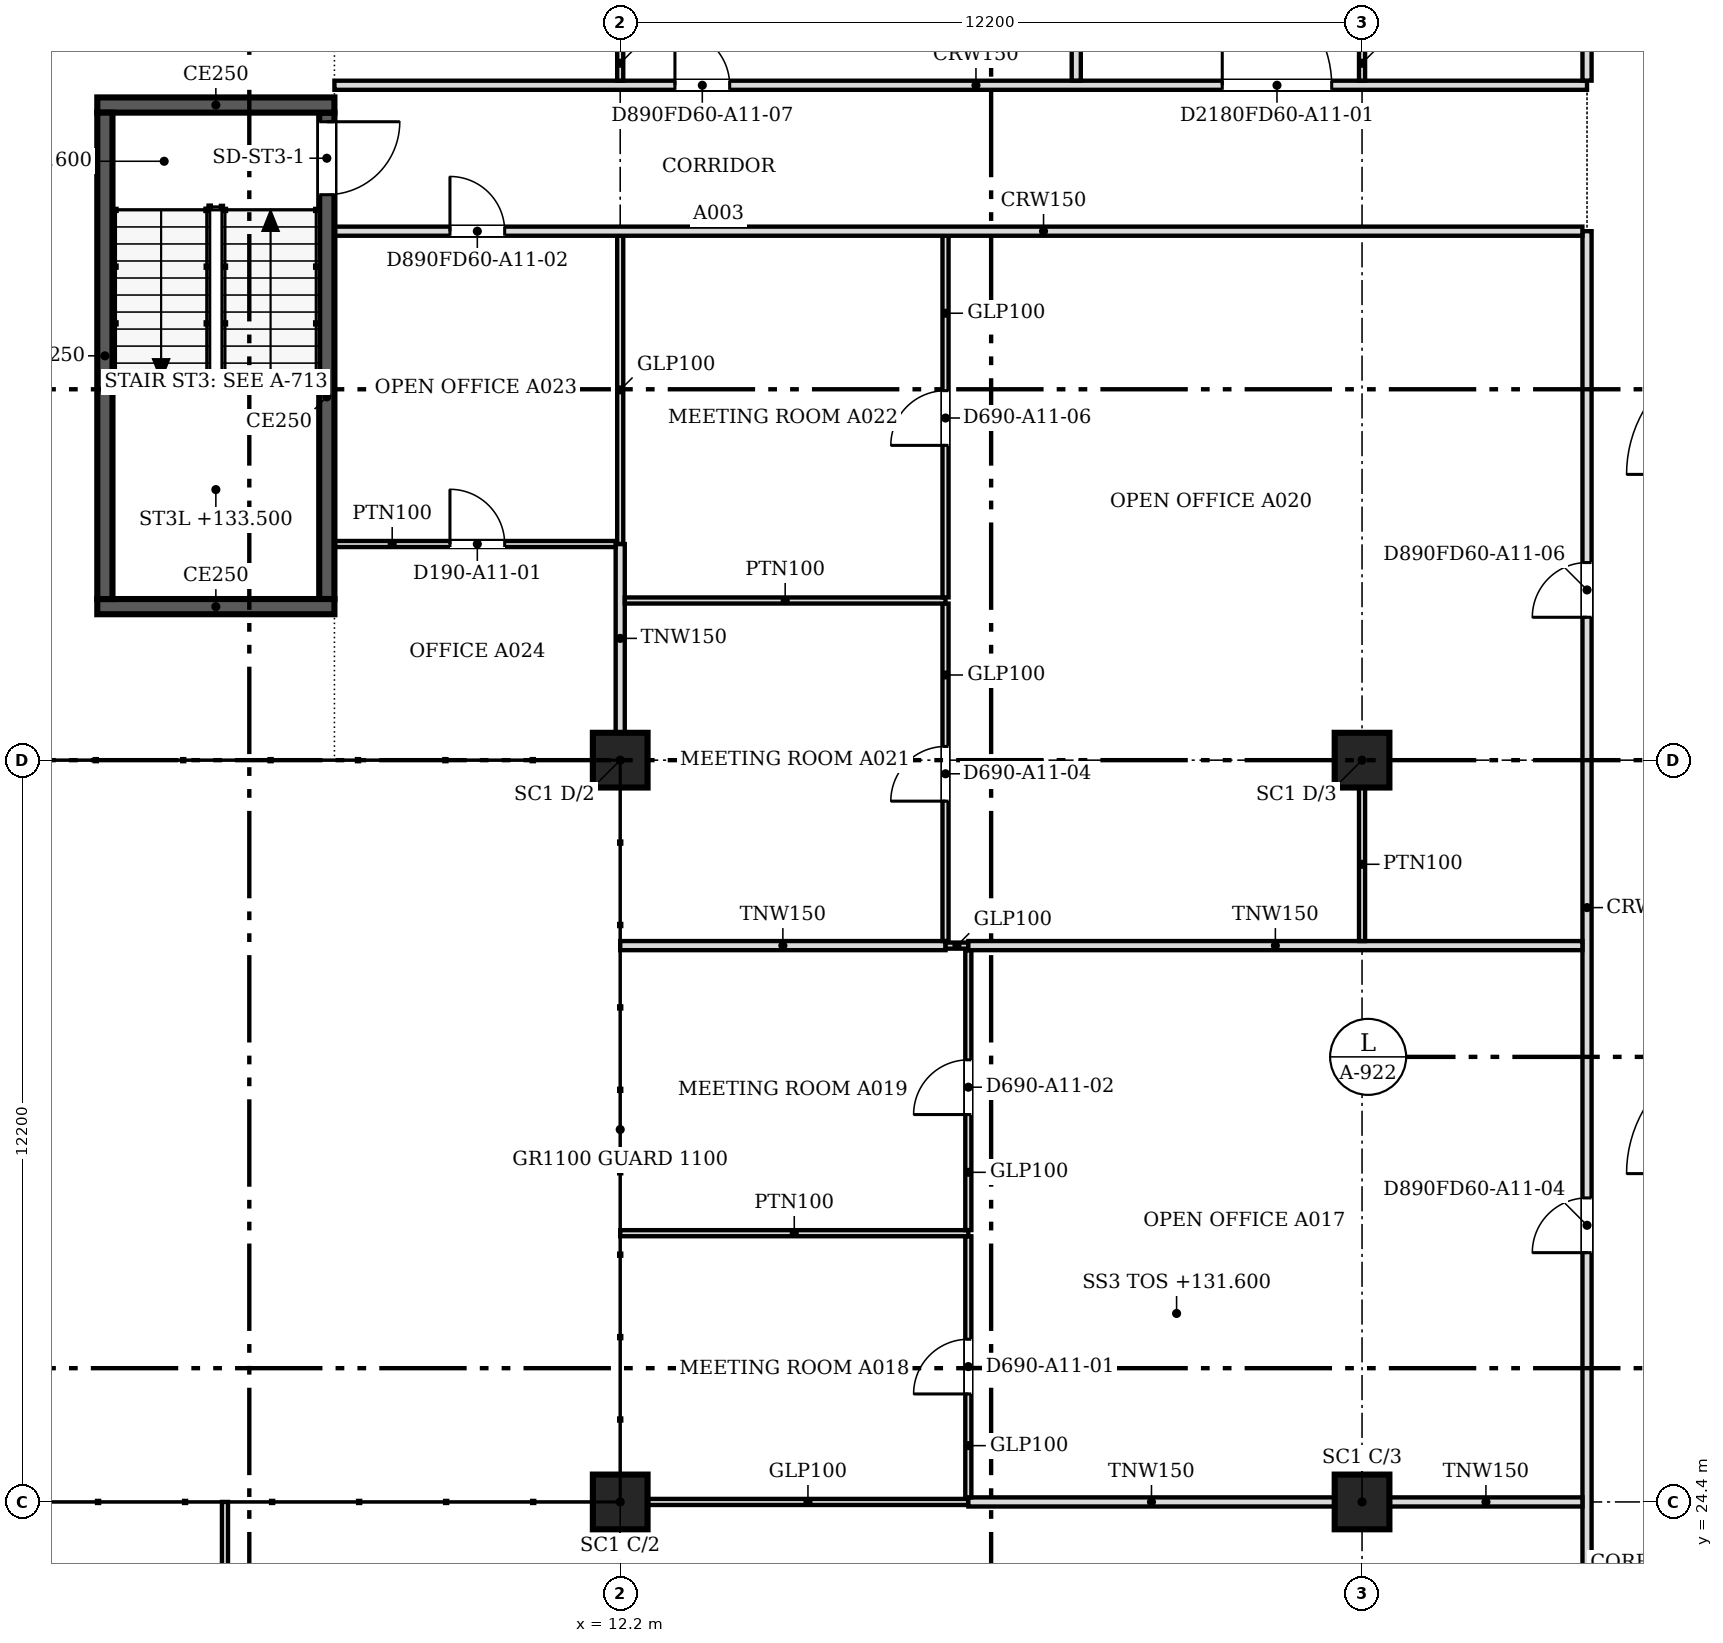
"""IFC4 building model, lengths in metres.
Left out: names, types, materials, properties, quantities, classifications, styles, units other than length and angle.
Written with IfcOpenShell. Run it as: python <this file> out.ifc"""

import sys

from ifc_helpers import new_model, si_unit, direction, frame, frame_2d, origin, origin_2d, place, context, subcontext, project, spatial, rectangle, extrude, source, transform, mapped, element, fill, save


model = new_model("IFC4")
c1 = context("Model", 3, precision=1e-05, world=origin(), true_north=direction((0.0, 1.0)))
c2 = subcontext(c1, "Body", "Model", "MODEL_VIEW")
j1 = project(units=[si_unit("LENGTHUNIT", "METRE"), si_unit("PLANEANGLEUNIT", "RADIAN")], contexts=[c1])
p1 = place(None, origin())
s1 = spatial("IfcSite", under=j1, at=p1, CompositionType="ELEMENT")
p2 = place(p1, origin())
s2 = spatial("IfcBuilding", under=s1, at=p2, CompositionType="ELEMENT")
p3 = place(p2, frame((0.0, 0.0, 131.6)))
s3 = spatial("IfcBuildingStorey", under=s2, at=p3, CompositionType="ELEMENT", Elevation=131.6)
for number, where, z_axis, x_axis in (
    (1, (12.2, 24.4, 0.0), (0.0, 0.0, 1.0), (1.0, 0.0, 0.0)),
    (2, (12.2, 36.6, 0.0), (0.0, 0.0, 1.0), (1.0, 0.0, 0.0)),
    (3, (24.4, 24.4, 0.0), (0.0, 0.0, 1.0), (1.0, 0.0, 0.0)),
    (4, (24.4, 36.6, 0.0), (0.0, 0.0, 1.0), (1.0, 0.0, 0.0)),
):
    element("IfcColumn", number, at=place(p3, frame(where, z_axis=z_axis, x_axis=x_axis)), inside=s3, PredefinedType="COLUMN", context=c2, shape_type="SweptSolid", body=[
        extrude(rectangle(XDim=0.9, YDim=0.9, at=origin_2d()), origin(), (0.0, 0.0, 1.0), 3.6),
    ])
p4 = place(p3, frame((7.5, 39.125, 0.0), z_axis=(0.0, 0.0, 1.0), x_axis=(-1.0, 0.0, 0.0)))
e5 = element("IfcWall", 5, at=p4, inside=s3, PredefinedType="SOLIDWALL", context=c2, shape_type="SweptSolid", body=[
    extrude(rectangle(XDim=3.9, YDim=0.25, at=frame_2d((1.95, 0.0))), origin(), (0.0, 0.0, 1.0), 3.8),
])
p5 = place(p3, frame((3.725, 39.25, 0.0), z_axis=(0.0, 0.0, 1.0), x_axis=(0.0, 1.0, 0.0)))
e6 = element("IfcWall", 6, at=p5, inside=s3, PredefinedType="SOLIDWALL", context=c2, shape_type="SweptSolid", body=[
    extrude(rectangle(XDim=8.0, YDim=0.25, at=frame_2d((4.0, 0.0))), origin(), (0.0, 0.0, 1.0), 3.8),
])
p6 = place(p3, frame((3.6, 47.375, 0.0), z_axis=(0.0, 0.0, 1.0), x_axis=(1.0, 0.0, 0.0)))
e7 = element("IfcWall", 7, at=p6, inside=s3, PredefinedType="SOLIDWALL", context=c2, shape_type="SweptSolid", body=[
    extrude(rectangle(XDim=3.9, YDim=0.25, at=frame_2d((1.95, 0.0))), origin(), (0.0, 0.0, 1.0), 3.8),
])
p7 = place(p3, frame((7.375, 47.25, 0.0), z_axis=(0.0, 0.0, 1.0), x_axis=(0.0, -1.0, 0.0)))
e8 = element("IfcWall", 8, at=p7, inside=s3, PredefinedType="SOLIDWALL", context=c2, shape_type="SweptSolid", body=[
    extrude(rectangle(XDim=8.0, YDim=0.25, at=frame_2d((4.0, 0.0))), origin(), (0.0, 0.0, 1.0), 3.8),
])
m1 = source(origin(), c2, "Body", "SweptSolid", [
    extrude(rectangle(XDim=1.2, YDim=2.1, at=frame_2d((0.6, 1.05))), frame((0.0, 0.135, 0.0), z_axis=(0.0, -1.0, 0.0), x_axis=(1.0, 0.0, 0.0)), (0.0, 0.0, 1.0), 0.27),
])
p8 = place(p7, frame((0.15, 0.0, 0.0)))
e9 = element("IfcOpeningElement", 9, at=p8, cuts=e8, PredefinedType="OPENING", context=c2, shape_type="MappedRepresentation", body=[
    mapped(m1, transform((0.0, 0.0, 0.0), scale=1.0)),
])
p9 = place(p3, frame((28.1, 18.8, 0.0), z_axis=(0.0, 0.0, 1.0), x_axis=(0.0, 1.0, 0.0)))
e10 = element("IfcWall", 10, at=p9, inside=s3, PredefinedType="PARTITIONING", context=c2, shape_type="SweptSolid", body=[
    extrude(rectangle(XDim=26.5, YDim=0.15, at=frame_2d((13.25, 0.0))), origin(), (0.0, 0.0, 1.0), 3.067),
])
m2 = source(origin(), c2, "Body", "SweptSolid", [
    extrude(rectangle(XDim=0.9, YDim=2.1, at=frame_2d((0.45, 1.05))), frame((0.0, 0.085, 0.0), z_axis=(0.0, -1.0, 0.0), x_axis=(1.0, 0.0, 0.0)), (0.0, 0.0, 1.0), 0.17),
])
p10 = place(p9, frame((1.1, 0.0, 0.0)))
e11 = element("IfcOpeningElement", 11, at=p10, cuts=e10, PredefinedType="OPENING", context=c2, shape_type="MappedRepresentation", body=[
    mapped(m2, transform((0.0, 0.0, 0.0), scale=1.0)),
])
p11 = place(p9, frame((9.7, 0.0, 0.0)))
e12 = element("IfcOpeningElement", 12, at=p11, cuts=e10, PredefinedType="OPENING", context=c2, shape_type="MappedRepresentation", body=[
    mapped(m2, transform((0.0, 0.0, 0.0), scale=1.0)),
])
p12 = place(p9, frame((20.15, 0.0, 0.0)))
e13 = element("IfcOpeningElement", 13, at=p12, cuts=e10, PredefinedType="OPENING", context=c2, shape_type="MappedRepresentation", body=[
    mapped(m2, transform((0.0, 0.0, 0.0), scale=1.0)),
])
p13 = place(p3, frame((5.7, 18.99, 0.0), z_axis=(0.0, 0.0, 1.0), x_axis=(0.0, 1.0, 0.0)))
e14 = element("IfcWall", 14, at=p13, inside=s3, PredefinedType="PARTITIONING", context=c2, shape_type="SweptSolid", body=[
    extrude(rectangle(XDim=5.41, YDim=0.1, at=frame_2d((2.705, 0.0))), origin(), (0.0, 0.0, 1.0), 3.067),
])
m3 = source(origin(), c2, "Body", "SweptSolid", [
    extrude(rectangle(XDim=0.9, YDim=2.1, at=frame_2d((0.45, 1.05))), frame((0.0, 0.06, 0.0), z_axis=(0.0, -1.0, 0.0), x_axis=(1.0, 0.0, 0.0)), (0.0, 0.0, 1.0), 0.12),
])
p14 = place(p13, frame((2.3, 0.0, 0.0)))
e15 = element("IfcOpeningElement", 15, at=p14, cuts=e14, PredefinedType="OPENING", context=c2, shape_type="MappedRepresentation", body=[
    mapped(m3, transform((0.0, 0.0, 0.0), scale=1.0)),
])
p15 = place(p3, frame((12.651, 24.4, 0.0), z_axis=(0.0, 0.0, 1.0), x_axis=(1.0, 0.0, 0.0)))
e16 = element("IfcWall", 16, at=p15, inside=s3, PredefinedType="PARTITIONING", context=c2, shape_type="SweptSolid", body=[
    extrude(rectangle(XDim=5.273, YDim=0.1, at=frame_2d((2.637, 0.0))), origin(), (0.0, 0.0, 1.0), 3.067),
])
p16 = place(p3, frame((17.925, 24.4, 0.0), z_axis=(0.0, 0.0, 1.0), x_axis=(1.0, 0.0, 0.0)))
e17 = element("IfcWall", 17, at=p16, inside=s3, PredefinedType="PARTITIONING", context=c2, shape_type="SweptSolid", body=[
    extrude(rectangle(XDim=6.024, YDim=0.15, at=frame_2d((3.012, 0.0))), origin(), (0.0, 0.0, 1.0), 3.067),
])
p17 = place(p3, frame((24.851, 24.4, 0.0), z_axis=(0.0, 0.0, 1.0), x_axis=(1.0, 0.0, 0.0)))
e18 = element("IfcWall", 18, at=p17, inside=s3, PredefinedType="PARTITIONING", context=c2, shape_type="SweptSolid", body=[
    extrude(rectangle(XDim=3.173, YDim=0.15, at=frame_2d((1.586, 0.0))), origin(), (0.0, 0.0, 1.0), 3.067),
])
p18 = place(p3, frame((17.925, 24.476, 0.0), z_axis=(0.0, 0.0, 1.0), x_axis=(0.0, 1.0, 0.0)))
e19 = element("IfcWall", 19, at=p18, inside=s3, PredefinedType="PARTITIONING", context=c2, shape_type="SweptSolid", body=[
    extrude(rectangle(XDim=4.293, YDim=0.1, at=frame_2d((2.146, 0.0))), origin(), (0.0, 0.0, 1.0), 3.067),
])
p19 = place(p18, frame((1.7, 0.0, 0.0)))
e20 = element("IfcOpeningElement", 20, at=p19, cuts=e19, PredefinedType="OPENING", context=c2, shape_type="MappedRepresentation", body=[
    mapped(m3, transform((0.0, 0.0, 0.0), scale=1.0)),
])
p20 = place(p3, frame((12.2, 28.82, 0.0), z_axis=(0.0, 0.0, 1.0), x_axis=(1.0, 0.0, 0.0)))
e21 = element("IfcWall", 21, at=p20, inside=s3, PredefinedType="PARTITIONING", context=c2, shape_type="SweptSolid", body=[
    extrude(rectangle(XDim=5.725, YDim=0.1, at=frame_2d((2.863, 0.0))), origin(), (0.0, 0.0, 1.0), 3.067),
])
p21 = place(p3, frame((17.925, 28.871, 0.0), z_axis=(0.0, 0.0, 1.0), x_axis=(0.0, 1.0, 0.0)))
e22 = element("IfcWall", 22, at=p21, inside=s3, PredefinedType="PARTITIONING", context=c2, shape_type="SweptSolid", body=[
    extrude(rectangle(XDim=4.603, YDim=0.1, at=frame_2d((2.301, 0.0))), origin(), (0.0, 0.0, 1.0), 3.067),
])
p22 = place(p21, frame((1.9, 0.0, 0.0)))
e23 = element("IfcOpeningElement", 23, at=p22, cuts=e22, PredefinedType="OPENING", context=c2, shape_type="MappedRepresentation", body=[
    mapped(m3, transform((0.0, 0.0, 0.0), scale=1.0)),
])
p23 = place(p3, frame((12.2, 33.55, 0.0), z_axis=(0.0, 0.0, 1.0), x_axis=(1.0, 0.0, 0.0)))
e24 = element("IfcWall", 24, at=p23, inside=s3, PredefinedType="PARTITIONING", context=c2, shape_type="SweptSolid", body=[
    extrude(rectangle(XDim=5.35, YDim=0.15, at=frame_2d((2.675, 0.0))), origin(), (0.0, 0.0, 1.0), 3.067),
])
p24 = place(p3, frame((17.551, 33.55, 0.0), z_axis=(0.0, 0.0, 1.0), x_axis=(1.0, 0.0, 0.0)))
e25 = element("IfcWall", 25, at=p24, inside=s3, PredefinedType="PARTITIONING", context=c2, shape_type="SweptSolid", body=[
    extrude(rectangle(XDim=0.373, YDim=0.1, at=frame_2d((0.187, 0.0))), origin(), (0.0, 0.0, 1.0), 3.067),
])
p25 = place(p3, frame((17.925, 33.55, 0.0), z_axis=(0.0, 0.0, 1.0), x_axis=(1.0, 0.0, 0.0)))
e26 = element("IfcWall", 26, at=p25, inside=s3, PredefinedType="PARTITIONING", context=c2, shape_type="SweptSolid", body=[
    extrude(rectangle(XDim=10.099, YDim=0.15, at=frame_2d((5.049, 0.0))), origin(), (0.0, 0.0, 1.0), 3.067),
])
p26 = place(p3, frame((17.55, 33.626, 0.0), z_axis=(0.0, 0.0, 1.0), x_axis=(0.0, 1.0, 0.0)))
e27 = element("IfcWall", 27, at=p26, inside=s3, PredefinedType="PARTITIONING", context=c2, shape_type="SweptSolid", body=[
    extrude(rectangle(XDim=5.549, YDim=0.1, at=frame_2d((2.775, 0.0))), origin(), (0.0, 0.0, 1.0), 3.067),
])
p27 = place(p26, frame((2.3, 0.0, 0.0)))
e28 = element("IfcOpeningElement", 28, at=p27, cuts=e27, PredefinedType="OPENING", context=c2, shape_type="MappedRepresentation", body=[
    mapped(m3, transform((0.0, 0.0, 0.0), scale=1.0)),
])
p28 = place(p3, frame((24.4, 36.15, 0.0), z_axis=(0.0, 0.0, 1.0), x_axis=(0.0, -1.0, 0.0)))
e29 = element("IfcWall", 29, at=p28, inside=s3, PredefinedType="PARTITIONING", context=c2, shape_type="SweptSolid", body=[
    extrude(rectangle(XDim=2.525, YDim=0.1, at=frame_2d((1.262, 0.0))), origin(), (0.0, 0.0, 1.0), 3.067),
])
p29 = place(p3, frame((12.2, 37.051, 0.0), z_axis=(0.0, 0.0, 1.0), x_axis=(0.0, 1.0, 0.0)))
e30 = element("IfcWall", 30, at=p29, inside=s3, PredefinedType="PARTITIONING", context=c2, shape_type="SweptSolid", body=[
    extrude(rectangle(XDim=3.104, YDim=0.15, at=frame_2d((1.552, 0.0))), origin(), (0.0, 0.0, 1.0), 3.067),
])
p30 = place(p3, frame((12.276, 39.226, 0.0), z_axis=(0.0, 0.0, 1.0), x_axis=(1.0, 0.0, 0.0)))
e31 = element("IfcWall", 31, at=p30, inside=s3, PredefinedType="PARTITIONING", context=c2, shape_type="SweptSolid", body=[
    extrude(rectangle(XDim=5.274, YDim=0.1, at=frame_2d((2.637, 0.0))), origin(), (0.0, 0.0, 1.0), 3.067),
])
p31 = place(p3, frame((17.55, 39.277, 0.0), z_axis=(0.0, 0.0, 1.0), x_axis=(0.0, 1.0, 0.0)))
e32 = element("IfcWall", 32, at=p31, inside=s3, PredefinedType="PARTITIONING", context=c2, shape_type="SweptSolid", body=[
    extrude(rectangle(XDim=5.947, YDim=0.1, at=frame_2d((2.973, 0.0))), origin(), (0.0, 0.0, 1.0), 3.067),
])
p32 = place(p31, frame((2.5, 0.0, 0.0)))
e33 = element("IfcOpeningElement", 33, at=p32, cuts=e32, PredefinedType="OPENING", context=c2, shape_type="MappedRepresentation", body=[
    mapped(m3, transform((0.0, 0.0, 0.0), scale=1.0)),
])
p33 = place(p3, frame((12.124, 40.155, 0.0), z_axis=(0.0, 0.0, 1.0), x_axis=(-1.0, 0.0, 0.0)))
e34 = element("IfcWall", 34, at=p33, inside=s3, PredefinedType="PARTITIONING", context=c2, shape_type="SweptSolid", body=[
    extrude(rectangle(XDim=4.624, YDim=0.1, at=frame_2d((2.312, 0.0))), origin(), (0.0, 0.0, 1.0), 3.067),
])
p34 = place(p33, frame((1.824, 0.0, 0.0)))
e35 = element("IfcOpeningElement", 35, at=p34, cuts=e34, PredefinedType="OPENING", context=c2, shape_type="MappedRepresentation", body=[
    mapped(m3, transform((0.0, 0.0, 0.0), scale=1.0)),
])
p35 = place(p3, frame((12.2, 40.156, 0.0), z_axis=(0.0, 0.0, 1.0), x_axis=(0.0, 1.0, 0.0)))
e36 = element("IfcWall", 36, at=p35, inside=s3, PredefinedType="PARTITIONING", context=c2, shape_type="SweptSolid", body=[
    extrude(rectangle(XDim=5.068, YDim=0.1, at=frame_2d((2.534, 0.0))), origin(), (0.0, 0.0, 1.0), 3.067),
])
p36 = place(p3, frame((28.024, 45.3, 0.0), z_axis=(0.0, 0.0, 1.0), x_axis=(-1.0, 0.0, 0.0)))
e37 = element("IfcWall", 37, at=p36, inside=s3, PredefinedType="PARTITIONING", context=c2, shape_type="SweptSolid", body=[
    extrude(rectangle(XDim=20.524, YDim=0.15, at=frame_2d((10.262, 0.0))), origin(), (0.0, 0.0, 1.0), 3.067),
])
p37 = place(p36, frame((17.724, 0.0, 0.0)))
e38 = element("IfcOpeningElement", 38, at=p37, cuts=e37, PredefinedType="OPENING", context=c2, shape_type="MappedRepresentation", body=[
    mapped(m2, transform((0.0, 0.0, 0.0), scale=1.0)),
])
p38 = place(p3, frame((7.5, 47.7, 0.0), z_axis=(0.0, 0.0, 1.0), x_axis=(1.0, 0.0, 0.0)))
e39 = element("IfcWall", 39, at=p38, inside=s3, PredefinedType="PARTITIONING", context=c2, shape_type="SweptSolid", body=[
    extrude(rectangle(XDim=20.6, YDim=0.15, at=frame_2d((10.3, 0.0))), origin(), (0.0, 0.0, 1.0), 3.067),
])
m4 = source(origin(), c2, "Body", "SweptSolid", [
    extrude(rectangle(XDim=1.8, YDim=2.1, at=frame_2d((0.9, 1.05))), frame((0.0, 0.085, 0.0), z_axis=(0.0, -1.0, 0.0), x_axis=(1.0, 0.0, 0.0)), (0.0, 0.0, 1.0), 0.17),
])
p39 = place(p38, frame((14.601, 0.0, 0.0)))
e40 = element("IfcOpeningElement", 40, at=p39, cuts=e39, PredefinedType="OPENING", context=c2, shape_type="MappedRepresentation", body=[
    mapped(m4, transform((0.0, 0.0, 0.0), scale=1.0)),
])
p40 = place(p38, frame((5.6, 0.0, 0.0)))
e41 = element("IfcOpeningElement", 41, at=p40, cuts=e39, PredefinedType="OPENING", context=c2, shape_type="MappedRepresentation", body=[
    mapped(m2, transform((0.0, 0.0, 0.0), scale=1.0)),
])
p41 = place(p3, frame((19.7, 47.776, 0.0), z_axis=(0.0, 0.0, 1.0), x_axis=(0.0, 1.0, 0.0)))
e42 = element("IfcWall", 42, at=p41, inside=s3, PredefinedType="PARTITIONING", context=c2, shape_type="SweptSolid", body=[
    extrude(rectangle(XDim=3.498, YDim=0.15, at=frame_2d((1.749, 0.0))), origin(), (0.0, 0.0, 1.0), 3.067),
])
p42 = place(p3, frame((28.1, 47.776, 0.0), z_axis=(0.0, 0.0, 1.0), x_axis=(0.0, 1.0, 0.0)))
e43 = element("IfcWall", 43, at=p42, inside=s3, PredefinedType="PARTITIONING", context=c2, shape_type="SweptSolid", body=[
    extrude(rectangle(XDim=3.348, YDim=0.15, at=frame_2d((1.674, 0.0))), origin(), (0.0, 0.0, 1.0), 3.067),
])
for number, where, z_axis, x_axis in (
    (44, (12.2, 48.35, 0.0), (0.0, 0.0, 1.0), (0.0, -1.0, 0.0)),
    (45, (24.4, 48.35, 0.0), (0.0, 0.0, 1.0), (0.0, -1.0, 0.0)),
):
    element("IfcWall", number, at=place(p3, frame(where, z_axis=z_axis, x_axis=x_axis)), inside=s3, PredefinedType="PARTITIONING", context=c2, shape_type="SweptSolid", body=[
        extrude(rectangle(XDim=0.575, YDim=0.1, at=frame_2d((0.288, 0.0))), origin(), (0.0, 0.0, 1.0), 3.067),
    ])
m5 = source(origin(), c2, "Body", "SweptSolid", [
    extrude(rectangle(XDim=1.2, YDim=2.1, at=frame_2d((0.6, 1.05))), frame((0.0, 0.025, 0.0), z_axis=(0.0, -1.0, 0.0), x_axis=(1.0, 0.0, 0.0)), (0.0, 0.0, 1.0), 0.05),
])
p43 = place(p8, origin())
e46 = element("IfcDoor", 46, at=p43, inside=s3, OperationType="SINGLE_SWING_LEFT", PredefinedType="DOOR", context=c2, shape_type="MappedRepresentation", body=[
    mapped(m5, transform((0.0, 0.0, 0.0), scale=1.0)),
])
fill(e9, e46)
m6 = source(origin(), c2, "Body", "SweptSolid", [
    extrude(rectangle(XDim=0.9, YDim=2.1, at=frame_2d((0.45, 1.05))), frame((0.0, 0.025, 0.0), z_axis=(0.0, -1.0, 0.0), x_axis=(1.0, 0.0, 0.0)), (0.0, 0.0, 1.0), 0.05),
])
p44 = place(p19, origin())
e47 = element("IfcDoor", 47, at=p44, inside=s3, OperationType="SINGLE_SWING_LEFT", PredefinedType="DOOR", context=c2, shape_type="MappedRepresentation", body=[
    mapped(m6, transform((0.0, 0.0, 0.0), scale=1.0)),
])
fill(e20, e47)
p45 = place(p22, origin())
e48 = element("IfcDoor", 48, at=p45, inside=s3, OperationType="SINGLE_SWING_LEFT", PredefinedType="DOOR", context=c2, shape_type="MappedRepresentation", body=[
    mapped(m6, transform((0.0, 0.0, 0.0), scale=1.0)),
])
fill(e23, e48)
p46 = place(p34, origin())
e49 = element("IfcDoor", 49, at=p46, inside=s3, OperationType="SINGLE_SWING_RIGHT", PredefinedType="DOOR", context=c2, shape_type="MappedRepresentation", body=[
    mapped(m6, transform((0.0, 0.0, 0.0), scale=1.0)),
])
fill(e35, e49)
p47 = place(p37, origin())
e50 = element("IfcDoor", 50, at=p47, inside=s3, OperationType="SINGLE_SWING_RIGHT", PredefinedType="DOOR", context=c2, shape_type="MappedRepresentation", body=[
    mapped(m6, transform((0.0, 0.0, 0.0), scale=1.0)),
])
fill(e38, e50)
p48 = place(p27, origin())
e51 = element("IfcDoor", 51, at=p48, inside=s3, OperationType="SINGLE_SWING_LEFT", PredefinedType="DOOR", context=c2, shape_type="MappedRepresentation", body=[
    mapped(m6, transform((0.0, 0.0, 0.0), scale=1.0)),
])
fill(e28, e51)
p49 = place(p32, origin())
e52 = element("IfcDoor", 52, at=p49, inside=s3, OperationType="SINGLE_SWING_LEFT", PredefinedType="DOOR", context=c2, shape_type="MappedRepresentation", body=[
    mapped(m6, transform((0.0, 0.0, 0.0), scale=1.0)),
])
fill(e33, e52)
m7 = source(origin(), c2, "Body", "SweptSolid", [
    extrude(rectangle(XDim=1.8, YDim=2.1, at=frame_2d((0.9, 1.05))), frame((0.0, 0.025, 0.0), z_axis=(0.0, -1.0, 0.0), x_axis=(1.0, 0.0, 0.0)), (0.0, 0.0, 1.0), 0.05),
])
p50 = place(p39, origin())
e53 = element("IfcDoor", 53, at=p50, inside=s3, OperationType="DOUBLE_DOOR_SINGLE_SWING", PredefinedType="DOOR", context=c2, shape_type="MappedRepresentation", body=[
    mapped(m7, transform((0.0, 0.0, 0.0), scale=1.0)),
])
fill(e40, e53)
p51 = place(p11, origin())
e54 = element("IfcDoor", 54, at=p51, inside=s3, OperationType="SINGLE_SWING_LEFT", PredefinedType="DOOR", context=c2, shape_type="MappedRepresentation", body=[
    mapped(m6, transform((0.0, 0.0, 0.0), scale=1.0)),
])
fill(e12, e54)
p52 = place(p12, origin())
e55 = element("IfcDoor", 55, at=p52, inside=s3, OperationType="SINGLE_SWING_LEFT", PredefinedType="DOOR", context=c2, shape_type="MappedRepresentation", body=[
    mapped(m6, transform((0.0, 0.0, 0.0), scale=1.0)),
])
fill(e13, e55)
p53 = place(p40, origin())
e56 = element("IfcDoor", 56, at=p53, inside=s3, OperationType="SINGLE_SWING_LEFT", PredefinedType="DOOR", context=c2, shape_type="MappedRepresentation", body=[
    mapped(m6, transform((0.0, 0.0, 0.0), scale=1.0)),
])
fill(e41, e56)
save(model, sys.argv[1])
